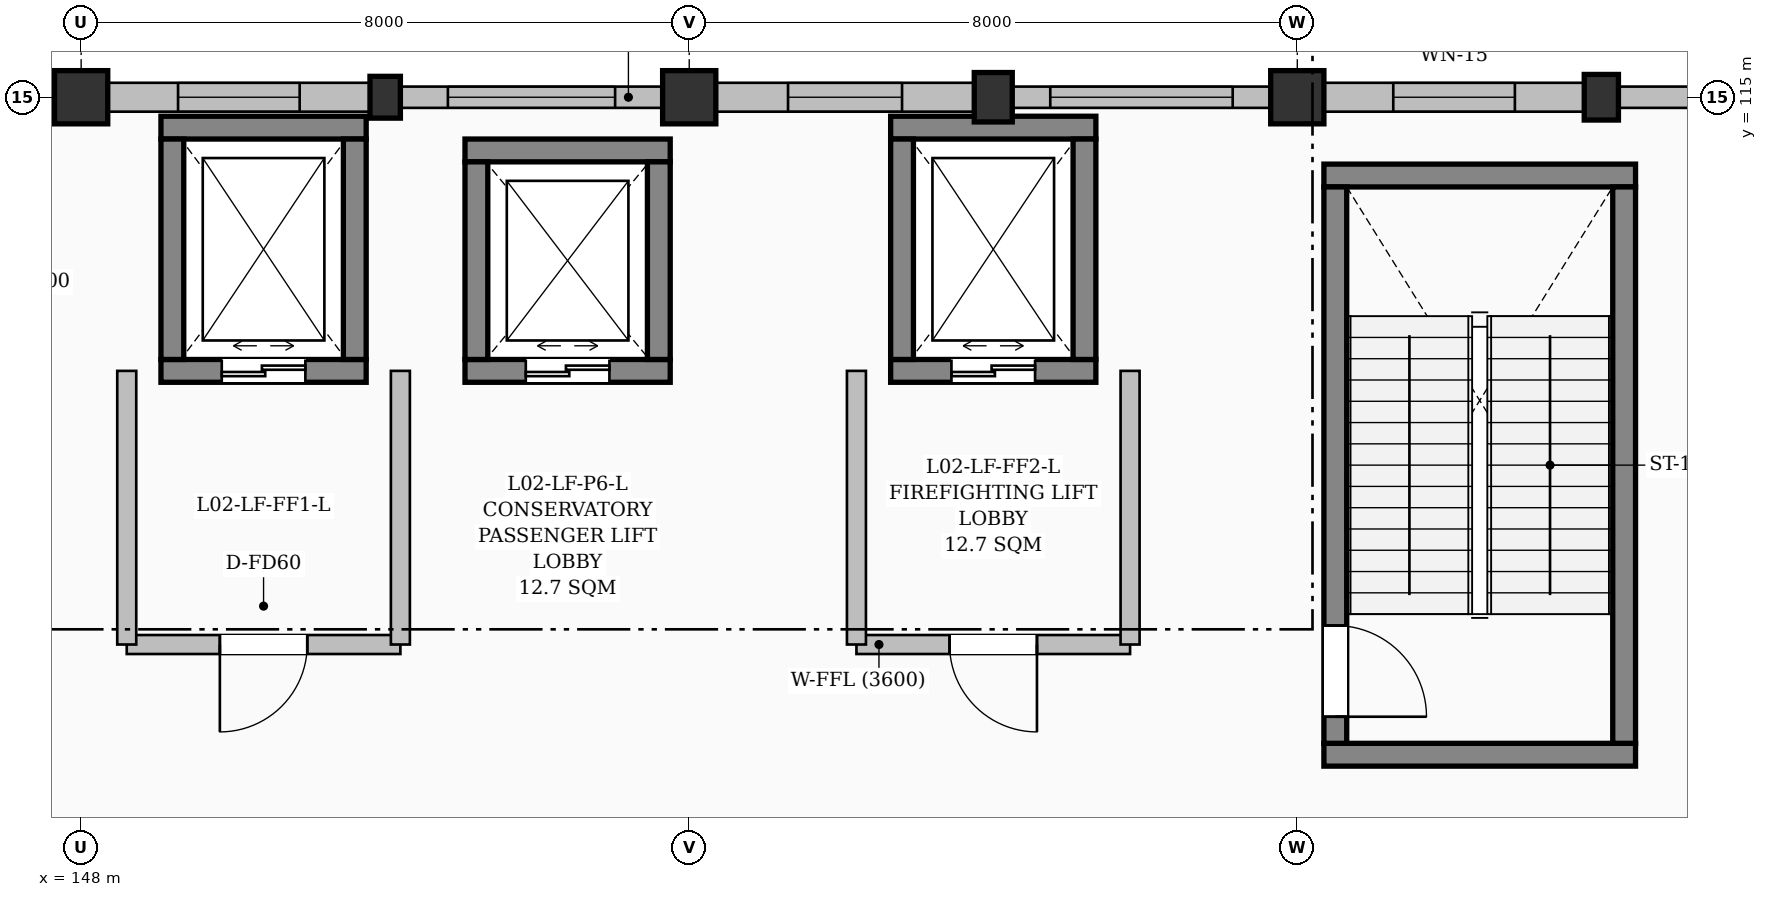
"""IFC4 building model, lengths in metres.
Left out: names, types, materials, properties, quantities, classifications, styles, units other than length and angle.
Written with IfcOpenShell. Run it as: python <this file> out.ifc"""

import sys

from ifc_helpers import new_model, si_unit, direction, frame, frame_2d, origin, origin_2d, place, context, subcontext, project, spatial, rectangle, extrude, element, fill, save


model = new_model("IFC4")
c1 = context("Model", 3, precision=1e-05, world=origin(), true_north=direction((0.0, 1.0)))
c2 = subcontext(c1, "Body", "Model", "MODEL_VIEW")
j1 = project(units=[si_unit("LENGTHUNIT", "METRE"), si_unit("PLANEANGLEUNIT", "RADIAN")], contexts=[c1])
p1 = place(None, origin())
s1 = spatial("IfcSite", under=j1, at=p1, CompositionType="ELEMENT")
p2 = place(p1, origin())
s2 = spatial("IfcBuilding", under=s1, at=p2, CompositionType="ELEMENT")
p3 = place(p2, frame((0.0, 0.0, 9.3)))
s3 = spatial("IfcBuildingStorey", under=s2, at=p3, CompositionType="ELEMENT", Elevation=9.3)
p4 = place(p3, frame((148.0, 115.0, 0.0), z_axis=(0.0, 0.0, 1.0), x_axis=(1.0, 0.0, 0.0)))
e1 = element("IfcColumn", 1, at=p4, inside=s3, PredefinedType="COLUMN", context=c2, shape_type="SweptSolid", body=[
    extrude(rectangle(XDim=0.7, YDim=0.7, at=origin_2d()), origin(), (0.0, 0.0, 1.0), 4.5),
])
p5 = place(p3, frame((152.0, 115.0, 0.0), z_axis=(0.0, 0.0, 1.0), x_axis=(1.0, 0.0, 0.0)))
e2 = element("IfcColumn", 2, at=p5, inside=s3, PredefinedType="PILASTER", context=c2, shape_type="SweptSolid", body=[
    extrude(rectangle(XDim=0.4, YDim=0.55, at=origin_2d()), origin(), (0.0, 0.0, 1.0), 4.5),
])
p6 = place(p3, frame((156.0, 115.0, 0.0), z_axis=(0.0, 0.0, 1.0), x_axis=(1.0, 0.0, 0.0)))
e3 = element("IfcColumn", 3, at=p6, inside=s3, PredefinedType="COLUMN", context=c2, shape_type="SweptSolid", body=[
    extrude(rectangle(XDim=0.7, YDim=0.7, at=origin_2d()), origin(), (0.0, 0.0, 1.0), 4.5),
])
p7 = place(p3, frame((160.0, 115.0, 0.0), z_axis=(0.0, 0.0, 1.0), x_axis=(1.0, 0.0, 0.0)))
e4 = element("IfcColumn", 4, at=p7, inside=s3, PredefinedType="PILASTER", context=c2, shape_type="SweptSolid", body=[
    extrude(rectangle(XDim=0.5, YDim=0.65, at=origin_2d()), origin(), (0.0, 0.0, 1.0), 4.5),
])
p8 = place(p3, frame((164.0, 115.0, 0.0), z_axis=(0.0, 0.0, 1.0), x_axis=(1.0, 0.0, 0.0)))
e5 = element("IfcColumn", 5, at=p8, inside=s3, PredefinedType="COLUMN", context=c2, shape_type="SweptSolid", body=[
    extrude(rectangle(XDim=0.7, YDim=0.7, at=origin_2d()), origin(), (0.0, 0.0, 1.0), 4.5),
])
p9 = place(p3, frame((168.0, 115.0, 0.0), z_axis=(0.0, 0.0, 1.0), x_axis=(1.0, 0.0, 0.0)))
e6 = element("IfcColumn", 6, at=p9, inside=s3, PredefinedType="PILASTER", context=c2, shape_type="SweptSolid", body=[
    extrude(rectangle(XDim=0.45, YDim=0.6, at=origin_2d()), origin(), (0.0, 0.0, 1.0), 4.5),
])
p10 = place(p3, frame((144.225, 115.0, 0.0), z_axis=(0.0, 0.0, 1.0), x_axis=(1.0, 0.0, 0.0)))
e7 = element("IfcWall", 7, at=p10, inside=s3, PredefinedType="SOLIDWALL", context=c2, shape_type="SweptSolid", body=[
    extrude(rectangle(XDim=3.425, YDim=0.28, at=frame_2d((1.712, 0.0))), origin(), (0.0, 0.0, 1.0), 3.655),
])
p11 = place(p10, frame((0.863, 0.0, 0.95)))
e8 = element("IfcOpeningElement", 8, at=p11, cuts=e7, PredefinedType="OPENING", context=c2, shape_type="SweptSolid", body=[
    extrude(rectangle(XDim=1.7, YDim=2.0, at=frame_2d((0.85, 1.0))), frame((0.0, 0.15, 0.0), z_axis=(0.0, -1.0, 0.0), x_axis=(1.0, 0.0, 0.0)), (0.0, 0.0, 1.0), 0.3),
])
p12 = place(p3, frame((148.35, 115.0, 0.0), z_axis=(0.0, 0.0, 1.0), x_axis=(1.0, 0.0, 0.0)))
e9 = element("IfcWall", 9, at=p12, inside=s3, PredefinedType="SOLIDWALL", context=c2, shape_type="SweptSolid", body=[
    extrude(rectangle(XDim=3.45, YDim=0.38, at=frame_2d((1.725, 0.0))), origin(), (0.0, 0.0, 1.0), 3.955),
])
p13 = place(p12, frame((0.925, 0.0, 0.95)))
e10 = element("IfcOpeningElement", 10, at=p13, cuts=e9, PredefinedType="OPENING", context=c2, shape_type="SweptSolid", body=[
    extrude(rectangle(XDim=1.6, YDim=1.8, at=frame_2d((0.8, 0.9))), frame((0.0, 0.2, 0.0), z_axis=(0.0, -1.0, 0.0), x_axis=(1.0, 0.0, 0.0)), (0.0, 0.0, 1.0), 0.4),
])
p14 = place(p3, frame((152.2, 115.0, 0.0), z_axis=(0.0, 0.0, 1.0), x_axis=(1.0, 0.0, 0.0)))
e11 = element("IfcWall", 11, at=p14, inside=s3, PredefinedType="SOLIDWALL", context=c2, shape_type="SweptSolid", body=[
    extrude(rectangle(XDim=3.45, YDim=0.28, at=frame_2d((1.725, 0.0))), origin(), (0.0, 0.0, 1.0), 3.955),
])
p15 = place(p14, frame((0.625, 0.0, 0.95)))
e12 = element("IfcOpeningElement", 12, at=p15, cuts=e11, PredefinedType="OPENING", context=c2, shape_type="SweptSolid", body=[
    extrude(rectangle(XDim=2.2, YDim=1.8, at=frame_2d((1.1, 0.9))), frame((0.0, 0.15, 0.0), z_axis=(0.0, -1.0, 0.0), x_axis=(1.0, 0.0, 0.0)), (0.0, 0.0, 1.0), 0.3),
])
p16 = place(p3, frame((156.35, 115.0, 0.0), z_axis=(0.0, 0.0, 1.0), x_axis=(1.0, 0.0, 0.0)))
e13 = element("IfcWall", 13, at=p16, inside=s3, PredefinedType="SOLIDWALL", context=c2, shape_type="SweptSolid", body=[
    extrude(rectangle(XDim=3.4, YDim=0.38, at=frame_2d((1.7, 0.0))), origin(), (0.0, 0.0, 1.0), 3.755),
])
p17 = place(p16, frame((0.95, 0.0, 0.95)))
e14 = element("IfcOpeningElement", 14, at=p17, cuts=e13, PredefinedType="OPENING", context=c2, shape_type="SweptSolid", body=[
    extrude(rectangle(XDim=1.5, YDim=1.5, at=frame_2d((0.75, 0.75))), frame((0.0, 0.2, 0.0), z_axis=(0.0, -1.0, 0.0), x_axis=(1.0, 0.0, 0.0)), (0.0, 0.0, 1.0), 0.4),
])
p18 = place(p3, frame((160.25, 115.0, 0.0), z_axis=(0.0, 0.0, 1.0), x_axis=(1.0, 0.0, 0.0)))
e15 = element("IfcWall", 15, at=p18, inside=s3, PredefinedType="SOLIDWALL", context=c2, shape_type="SweptSolid", body=[
    extrude(rectangle(XDim=3.4, YDim=0.28, at=frame_2d((1.7, 0.0))), origin(), (0.0, 0.0, 1.0), 3.755),
])
p19 = place(p18, frame((0.5, 0.0, 0.95)))
e16 = element("IfcOpeningElement", 16, at=p19, cuts=e15, PredefinedType="OPENING", context=c2, shape_type="SweptSolid", body=[
    extrude(rectangle(XDim=2.4, YDim=1.5, at=frame_2d((1.2, 0.75))), frame((0.0, 0.15, 0.0), z_axis=(0.0, -1.0, 0.0), x_axis=(1.0, 0.0, 0.0)), (0.0, 0.0, 1.0), 0.3),
])
p20 = place(p3, frame((164.35, 115.0, 0.0), z_axis=(0.0, 0.0, 1.0), x_axis=(1.0, 0.0, 0.0)))
e17 = element("IfcWall", 17, at=p20, inside=s3, PredefinedType="SOLIDWALL", context=c2, shape_type="SweptSolid", body=[
    extrude(rectangle(XDim=3.425, YDim=0.38, at=frame_2d((1.712, 0.0))), origin(), (0.0, 0.0, 1.0), 3.705),
])
p21 = place(p20, frame((0.913, 0.0, 0.95)))
e18 = element("IfcOpeningElement", 18, at=p21, cuts=e17, PredefinedType="OPENING", context=c2, shape_type="SweptSolid", body=[
    extrude(rectangle(XDim=1.6, YDim=1.2, at=frame_2d((0.8, 0.6))), frame((0.0, 0.2, 0.0), z_axis=(0.0, -1.0, 0.0), x_axis=(1.0, 0.0, 0.0)), (0.0, 0.0, 1.0), 0.4),
])
p22 = place(p3, frame((168.225, 115.0, 0.0), z_axis=(0.0, 0.0, 1.0), x_axis=(1.0, 0.0, 0.0)))
e19 = element("IfcWall", 19, at=p22, inside=s3, PredefinedType="SOLIDWALL", context=c2, shape_type="SweptSolid", body=[
    extrude(rectangle(XDim=3.425, YDim=0.28, at=frame_2d((1.712, 0.0))), origin(), (0.0, 0.0, 1.0), 3.705),
])
p23 = place(p22, frame((1.262, 0.0, 0.95)))
e20 = element("IfcOpeningElement", 20, at=p23, cuts=e19, PredefinedType="OPENING", context=c2, shape_type="SweptSolid", body=[
    extrude(rectangle(XDim=0.9, YDim=1.8, at=frame_2d((0.45, 0.9))), frame((0.0, 0.15, 0.0), z_axis=(0.0, -1.0, 0.0), x_axis=(1.0, 0.0, 0.0)), (0.0, 0.0, 1.0), 0.3),
])
for number, where, z_axis, x_axis in (
    (21, (164.35, 106.35, 0.0), (0.0, 0.0, 1.0), (1.0, 0.0, 0.0)),
    (22, (168.45, 113.97, 0.0), (0.0, 0.0, 1.0), (-1.0, 0.0, 0.0)),
):
    element("IfcWall", number, at=place(p3, frame(where, z_axis=z_axis, x_axis=x_axis)), inside=s3, PredefinedType="SHEAR", context=c2, shape_type="SweptSolid", body=[
        extrude(rectangle(XDim=4.1, YDim=0.3, at=frame_2d((2.05, 0.0))), origin(), (0.0, 0.0, 1.0), 4.27),
    ])
p24 = place(p3, frame((164.5, 113.82, 0.0), z_axis=(0.0, 0.0, 1.0), x_axis=(0.0, -1.0, 0.0)))
e23 = element("IfcWall", 23, at=p24, inside=s3, PredefinedType="SHEAR", context=c2, shape_type="SweptSolid", body=[
    extrude(rectangle(XDim=7.32, YDim=0.3, at=frame_2d((3.66, 0.0))), origin(), (0.0, 0.0, 1.0), 4.27),
])
p25 = place(p24, frame((5.77, 0.0, 0.0)))
e24 = element("IfcOpeningElement", 24, at=p25, cuts=e23, PredefinedType="OPENING", context=c2, shape_type="SweptSolid", body=[
    extrude(rectangle(XDim=1.2, YDim=2.15, at=frame_2d((0.6, 1.075))), frame((0.0, 0.16, 0.0), z_axis=(0.0, -1.0, 0.0), x_axis=(1.0, 0.0, 0.0)), (0.0, 0.0, 1.0), 0.32),
])
p26 = place(p3, frame((168.3, 113.82, 0.0), z_axis=(0.0, 0.0, 1.0), x_axis=(0.0, -1.0, 0.0)))
e25 = element("IfcWall", 25, at=p26, inside=s3, PredefinedType="SHEAR", context=c2, shape_type="SweptSolid", body=[
    extrude(rectangle(XDim=7.32, YDim=0.3, at=frame_2d((3.66, 0.0))), origin(), (0.0, 0.0, 1.0), 4.27),
])
p27 = place(p3, frame((149.05, 111.4, 0.0), z_axis=(0.0, 0.0, 1.0), x_axis=(1.0, 0.0, 0.0)))
e26 = element("IfcWall", 26, at=p27, inside=s3, PredefinedType="SHEAR", context=c2, shape_type="SweptSolid", body=[
    extrude(rectangle(XDim=2.7, YDim=0.3, at=frame_2d((1.35, 0.0))), origin(), (0.0, 0.0, 1.0), 4.27),
])
p28 = place(p27, frame((0.8, 0.0, 0.0)))
e27 = element("IfcOpeningElement", 27, at=p28, cuts=e26, PredefinedType="OPENING", context=c2, shape_type="SweptSolid", body=[
    extrude(rectangle(XDim=1.1, YDim=2.15, at=frame_2d((0.55, 1.075))), frame((0.0, 0.16, 0.0), z_axis=(0.0, -1.0, 0.0), x_axis=(1.0, 0.0, 0.0)), (0.0, 0.0, 1.0), 0.32),
])
p29 = place(p3, frame((151.75, 114.6, 0.0), z_axis=(0.0, 0.0, 1.0), x_axis=(-1.0, 0.0, 0.0)))
e28 = element("IfcWall", 28, at=p29, inside=s3, PredefinedType="SHEAR", context=c2, shape_type="SweptSolid", body=[
    extrude(rectangle(XDim=2.7, YDim=0.3, at=frame_2d((1.35, 0.0))), origin(), (0.0, 0.0, 1.0), 4.27),
])
for number, where, z_axis, x_axis in (
    (29, (149.2, 111.55, 0.0), (0.0, 0.0, 1.0), (0.0, 1.0, 0.0)),
    (30, (151.6, 114.45, 0.0), (0.0, 0.0, 1.0), (0.0, -1.0, 0.0)),
):
    element("IfcWall", number, at=place(p3, frame(where, z_axis=z_axis, x_axis=x_axis)), inside=s3, PredefinedType="SHEAR", context=c2, shape_type="SweptSolid", body=[
        extrude(rectangle(XDim=2.9, YDim=0.3, at=frame_2d((1.45, 0.0))), origin(), (0.0, 0.0, 1.0), 4.27),
    ])
p30 = place(p3, frame((152.2, 107.8, 0.0), z_axis=(0.0, 0.0, 1.0), x_axis=(-1.0, 0.0, 0.0)))
e31 = element("IfcWall", 31, at=p30, inside=s3, PredefinedType="SOLIDWALL", context=c2, shape_type="SweptSolid", body=[
    extrude(rectangle(XDim=3.6, YDim=0.25, at=frame_2d((1.8, 0.0))), origin(), (0.0, 0.0, 1.0), 4.27),
])
p31 = place(p30, frame((1.225, 0.0, 0.0)))
e32 = element("IfcOpeningElement", 32, at=p31, cuts=e31, PredefinedType="OPENING", context=c2, shape_type="SweptSolid", body=[
    extrude(rectangle(XDim=1.15, YDim=2.15, at=frame_2d((0.575, 1.075))), frame((0.0, 0.135, 0.0), z_axis=(0.0, -1.0, 0.0), x_axis=(1.0, 0.0, 0.0)), (0.0, 0.0, 1.0), 0.27),
])
for number, where, z_axis, x_axis in (
    (33, (148.6, 107.8, 0.0), (0.0, 0.0, 1.0), (0.0, 1.0, 0.0)),
    (34, (152.2, 111.4, 0.0), (0.0, 0.0, 1.0), (0.0, -1.0, 0.0)),
):
    element("IfcWall", number, at=place(p3, frame(where, z_axis=z_axis, x_axis=x_axis)), inside=s3, PredefinedType="SOLIDWALL", context=c2, shape_type="SweptSolid", body=[
        extrude(rectangle(XDim=3.6, YDim=0.25, at=frame_2d((1.8, 0.0))), origin(), (0.0, 0.0, 1.0), 4.27),
    ])
p32 = place(p3, frame((158.65, 111.4, 0.0), z_axis=(0.0, 0.0, 1.0), x_axis=(1.0, 0.0, 0.0)))
e35 = element("IfcWall", 35, at=p32, inside=s3, PredefinedType="SHEAR", context=c2, shape_type="SweptSolid", body=[
    extrude(rectangle(XDim=2.7, YDim=0.3, at=frame_2d((1.35, 0.0))), origin(), (0.0, 0.0, 1.0), 4.27),
])
p33 = place(p32, frame((0.8, 0.0, 0.0)))
e36 = element("IfcOpeningElement", 36, at=p33, cuts=e35, PredefinedType="OPENING", context=c2, shape_type="SweptSolid", body=[
    extrude(rectangle(XDim=1.1, YDim=2.15, at=frame_2d((0.55, 1.075))), frame((0.0, 0.16, 0.0), z_axis=(0.0, -1.0, 0.0), x_axis=(1.0, 0.0, 0.0)), (0.0, 0.0, 1.0), 0.32),
])
p34 = place(p3, frame((161.35, 114.6, 0.0), z_axis=(0.0, 0.0, 1.0), x_axis=(-1.0, 0.0, 0.0)))
e37 = element("IfcWall", 37, at=p34, inside=s3, PredefinedType="SHEAR", context=c2, shape_type="SweptSolid", body=[
    extrude(rectangle(XDim=2.7, YDim=0.3, at=frame_2d((1.35, 0.0))), origin(), (0.0, 0.0, 1.0), 4.27),
])
for number, where, z_axis, x_axis in (
    (38, (158.8, 111.55, 0.0), (0.0, 0.0, 1.0), (0.0, 1.0, 0.0)),
    (39, (161.2, 114.45, 0.0), (0.0, 0.0, 1.0), (0.0, -1.0, 0.0)),
):
    element("IfcWall", number, at=place(p3, frame(where, z_axis=z_axis, x_axis=x_axis)), inside=s3, PredefinedType="SHEAR", context=c2, shape_type="SweptSolid", body=[
        extrude(rectangle(XDim=2.9, YDim=0.3, at=frame_2d((1.45, 0.0))), origin(), (0.0, 0.0, 1.0), 4.27),
    ])
p35 = place(p3, frame((161.8, 107.8, 0.0), z_axis=(0.0, 0.0, 1.0), x_axis=(-1.0, 0.0, 0.0)))
e40 = element("IfcWall", 40, at=p35, inside=s3, PredefinedType="SOLIDWALL", context=c2, shape_type="SweptSolid", body=[
    extrude(rectangle(XDim=3.6, YDim=0.25, at=frame_2d((1.8, 0.0))), origin(), (0.0, 0.0, 1.0), 4.27),
])
p36 = place(p35, frame((1.225, 0.0, 0.0)))
e41 = element("IfcOpeningElement", 41, at=p36, cuts=e40, PredefinedType="OPENING", context=c2, shape_type="SweptSolid", body=[
    extrude(rectangle(XDim=1.15, YDim=2.15, at=frame_2d((0.575, 1.075))), frame((0.0, 0.135, 0.0), z_axis=(0.0, -1.0, 0.0), x_axis=(1.0, 0.0, 0.0)), (0.0, 0.0, 1.0), 0.27),
])
for number, where, z_axis, x_axis in (
    (42, (158.2, 107.8, 0.0), (0.0, 0.0, 1.0), (0.0, 1.0, 0.0)),
    (43, (161.8, 111.4, 0.0), (0.0, 0.0, 1.0), (0.0, -1.0, 0.0)),
):
    element("IfcWall", number, at=place(p3, frame(where, z_axis=z_axis, x_axis=x_axis)), inside=s3, PredefinedType="SOLIDWALL", context=c2, shape_type="SweptSolid", body=[
        extrude(rectangle(XDim=3.6, YDim=0.25, at=frame_2d((1.8, 0.0))), origin(), (0.0, 0.0, 1.0), 4.27),
    ])
p37 = place(p3, frame((153.05, 111.4, 0.0), z_axis=(0.0, 0.0, 1.0), x_axis=(1.0, 0.0, 0.0)))
e44 = element("IfcWall", 44, at=p37, inside=s3, PredefinedType="SHEAR", context=c2, shape_type="SweptSolid", body=[
    extrude(rectangle(XDim=2.7, YDim=0.3, at=frame_2d((1.35, 0.0))), origin(), (0.0, 0.0, 1.0), 4.27),
])
p38 = place(p37, frame((0.8, 0.0, 0.0)))
e45 = element("IfcOpeningElement", 45, at=p38, cuts=e44, PredefinedType="OPENING", context=c2, shape_type="SweptSolid", body=[
    extrude(rectangle(XDim=1.1, YDim=2.15, at=frame_2d((0.55, 1.075))), frame((0.0, 0.16, 0.0), z_axis=(0.0, -1.0, 0.0), x_axis=(1.0, 0.0, 0.0)), (0.0, 0.0, 1.0), 0.32),
])
p39 = place(p3, frame((155.75, 114.3, 0.0), z_axis=(0.0, 0.0, 1.0), x_axis=(-1.0, 0.0, 0.0)))
e46 = element("IfcWall", 46, at=p39, inside=s3, PredefinedType="SHEAR", context=c2, shape_type="SweptSolid", body=[
    extrude(rectangle(XDim=2.7, YDim=0.3, at=frame_2d((1.35, 0.0))), origin(), (0.0, 0.0, 1.0), 4.27),
])
for number, where, z_axis, x_axis in (
    (47, (153.2, 111.55, 0.0), (0.0, 0.0, 1.0), (0.0, 1.0, 0.0)),
    (48, (155.6, 114.15, 0.0), (0.0, 0.0, 1.0), (0.0, -1.0, 0.0)),
):
    element("IfcWall", number, at=place(p3, frame(where, z_axis=z_axis, x_axis=x_axis)), inside=s3, PredefinedType="SHEAR", context=c2, shape_type="SweptSolid", body=[
        extrude(rectangle(XDim=2.6, YDim=0.3, at=frame_2d((1.3, 0.0))), origin(), (0.0, 0.0, 1.0), 4.27),
    ])
p40 = place(p13, origin())
e49 = element("IfcWindow", 49, at=p40, inside=s3, PartitioningType="DOUBLE_PANEL_VERTICAL", PredefinedType="WINDOW", context=c2, shape_type="SweptSolid", body=[
    extrude(rectangle(XDim=1.6, YDim=1.8, at=frame_2d((0.8, 0.9))), frame((0.0, 0.03, 0.0), z_axis=(0.0, -1.0, 0.0), x_axis=(1.0, 0.0, 0.0)), (0.0, 0.0, 1.0), 0.06),
])
fill(e10, e49)
p41 = place(p15, origin())
e50 = element("IfcWindow", 50, at=p41, inside=s3, PartitioningType="TRIPLE_PANEL_VERTICAL", PredefinedType="WINDOW", context=c2, shape_type="SweptSolid", body=[
    extrude(rectangle(XDim=2.2, YDim=1.8, at=frame_2d((1.1, 0.9))), frame((0.0, 0.03, 0.0), z_axis=(0.0, -1.0, 0.0), x_axis=(1.0, 0.0, 0.0)), (0.0, 0.0, 1.0), 0.06),
])
fill(e12, e50)
p42 = place(p17, origin())
e51 = element("IfcWindow", 51, at=p42, inside=s3, PartitioningType="DOUBLE_PANEL_VERTICAL", PredefinedType="WINDOW", context=c2, shape_type="SweptSolid", body=[
    extrude(rectangle(XDim=1.5, YDim=1.5, at=frame_2d((0.75, 0.75))), frame((0.0, 0.03, 0.0), z_axis=(0.0, -1.0, 0.0), x_axis=(1.0, 0.0, 0.0)), (0.0, 0.0, 1.0), 0.06),
])
fill(e14, e51)
p43 = place(p19, origin())
e52 = element("IfcWindow", 52, at=p43, inside=s3, PartitioningType="TRIPLE_PANEL_VERTICAL", PredefinedType="WINDOW", context=c2, shape_type="SweptSolid", body=[
    extrude(rectangle(XDim=2.4, YDim=1.5, at=frame_2d((1.2, 0.75))), frame((0.0, 0.03, 0.0), z_axis=(0.0, -1.0, 0.0), x_axis=(1.0, 0.0, 0.0)), (0.0, 0.0, 1.0), 0.06),
])
fill(e16, e52)
p44 = place(p21, origin())
e53 = element("IfcWindow", 53, at=p44, inside=s3, PartitioningType="DOUBLE_PANEL_HORIZONTAL", PredefinedType="WINDOW", context=c2, shape_type="SweptSolid", body=[
    extrude(rectangle(XDim=1.6, YDim=1.2, at=frame_2d((0.8, 0.6))), frame((0.0, 0.03, 0.0), z_axis=(0.0, -1.0, 0.0), x_axis=(1.0, 0.0, 0.0)), (0.0, 0.0, 1.0), 0.06),
])
fill(e18, e53)
p45 = place(p25, origin())
e54 = element("IfcDoor", 54, at=p45, inside=s3, OperationType="SINGLE_SWING_RIGHT", PredefinedType="DOOR", context=c2, shape_type="SweptSolid", body=[
    extrude(rectangle(XDim=1.2, YDim=2.15, at=frame_2d((0.6, 1.075))), frame((0.0, 0.025, 0.0), z_axis=(0.0, -1.0, 0.0), x_axis=(1.0, 0.0, 0.0)), (0.0, 0.0, 1.0), 0.05),
])
fill(e24, e54)
p46 = place(p28, origin())
e55 = element("IfcDoor", 55, at=p46, inside=s3, OperationType="DOUBLE_DOOR_SLIDING", PredefinedType="DOOR", context=c2, shape_type="SweptSolid", body=[
    extrude(rectangle(XDim=1.1, YDim=2.15, at=frame_2d((0.55, 1.075))), frame((0.0, 0.025, 0.0), z_axis=(0.0, -1.0, 0.0), x_axis=(1.0, 0.0, 0.0)), (0.0, 0.0, 1.0), 0.05),
])
fill(e27, e55)
p47 = place(p31, origin())
e56 = element("IfcDoor", 56, at=p47, inside=s3, OperationType="SINGLE_SWING_RIGHT", PredefinedType="DOOR", context=c2, shape_type="SweptSolid", body=[
    extrude(rectangle(XDim=1.15, YDim=2.15, at=frame_2d((0.575, 1.075))), frame((0.0, 0.025, 0.0), z_axis=(0.0, -1.0, 0.0), x_axis=(1.0, 0.0, 0.0)), (0.0, 0.0, 1.0), 0.05),
])
fill(e32, e56)
p48 = place(p33, origin())
e57 = element("IfcDoor", 57, at=p48, inside=s3, OperationType="DOUBLE_DOOR_SLIDING", PredefinedType="DOOR", context=c2, shape_type="SweptSolid", body=[
    extrude(rectangle(XDim=1.1, YDim=2.15, at=frame_2d((0.55, 1.075))), frame((0.0, 0.025, 0.0), z_axis=(0.0, -1.0, 0.0), x_axis=(1.0, 0.0, 0.0)), (0.0, 0.0, 1.0), 0.05),
])
fill(e36, e57)
p49 = place(p36, origin())
e58 = element("IfcDoor", 58, at=p49, inside=s3, OperationType="SINGLE_SWING_LEFT", PredefinedType="DOOR", context=c2, shape_type="SweptSolid", body=[
    extrude(rectangle(XDim=1.15, YDim=2.15, at=frame_2d((0.575, 1.075))), frame((0.0, 0.025, 0.0), z_axis=(0.0, -1.0, 0.0), x_axis=(1.0, 0.0, 0.0)), (0.0, 0.0, 1.0), 0.05),
])
fill(e41, e58)
p50 = place(p38, origin())
e59 = element("IfcDoor", 59, at=p50, inside=s3, OperationType="DOUBLE_DOOR_SLIDING", PredefinedType="DOOR", context=c2, shape_type="SweptSolid", body=[
    extrude(rectangle(XDim=1.1, YDim=2.15, at=frame_2d((0.55, 1.075))), frame((0.0, 0.025, 0.0), z_axis=(0.0, -1.0, 0.0), x_axis=(1.0, 0.0, 0.0)), (0.0, 0.0, 1.0), 0.05),
])
fill(e45, e59)
save(model, sys.argv[1])
